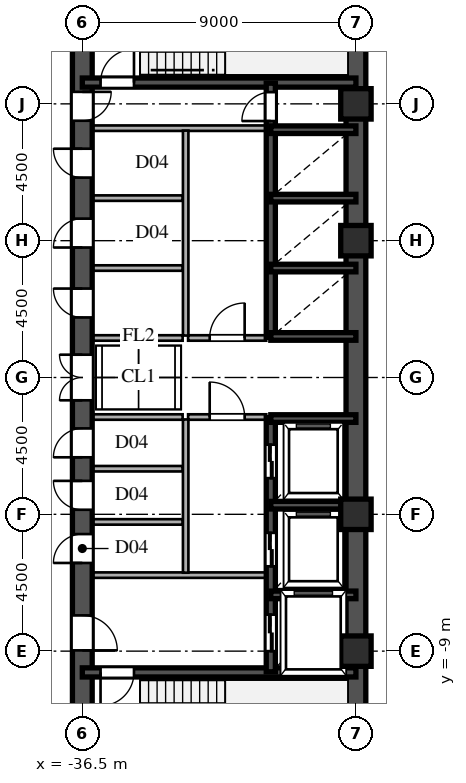
"""IFC4 building model, lengths in metres.
Left out: names, types, materials, properties, quantities, classifications, styles, units other than length and angle.
Written with IfcOpenShell. Run it as: python <this file> out.ifc"""

import sys

from ifc_helpers import new_model, si_unit, direction, frame, frame_2d, origin, origin_2d, place, context, subcontext, project, spatial, rectangle, hollow_rectangle, extrude, source, transform, mapped, element, fill, save


model = new_model("IFC4")
c1 = context("Model", 3, precision=1e-05, world=origin(), true_north=direction((0.0, 1.0)))
c2 = subcontext(c1, "Body", "Model", "MODEL_VIEW")
j1 = project(units=[si_unit("LENGTHUNIT", "METRE"), si_unit("PLANEANGLEUNIT", "RADIAN")], contexts=[c1])
p1 = place(None, origin())
s1 = spatial("IfcSite", under=j1, at=p1, CompositionType="ELEMENT")
p2 = place(p1, origin())
s2 = spatial("IfcBuilding", under=s1, at=p2, CompositionType="ELEMENT")
p3 = place(p2, frame((0.0, 0.0, 76.5)))
s3 = spatial("IfcBuildingStorey", under=s2, at=p3, CompositionType="ELEMENT", Elevation=76.5)
m1 = source(origin(), c2, "Body", "SweptSolid", [
    extrude(hollow_rectangle(XDim=1.0, YDim=1.0, WallThickness=0.042, at=origin_2d()), origin(), (0.0, 0.0, 1.0), 3.6),
])
for number, where, z_axis, x_axis in (
    (1, (-27.5, -9.0, 0.0), (0.0, 0.0, 1.0), (1.0, 0.0, 0.0)),
    (2, (-27.5, -4.5, 0.0), (0.0, 0.0, 1.0), (1.0, 0.0, 0.0)),
    (3, (-27.5, 4.5, 0.0), (0.0, 0.0, 1.0), (1.0, 0.0, 0.0)),
    (4, (-27.5, 9.0, 0.0), (0.0, 0.0, 1.0), (1.0, 0.0, 0.0)),
):
    element("IfcColumn", number, at=place(p3, frame(where, z_axis=z_axis, x_axis=x_axis)), inside=s3, PredefinedType="COLUMN", context=c2, shape_type="MappedRepresentation", body=[
        mapped(m1, transform((0.0, 0.0, 0.0), scale=1.0)),
    ])
for number, where, z_axis, x_axis in (
    (5, (-27.5, -13.5, 0.0), (0.0, 0.0, 1.0), (0.0, 1.0, 0.0)),
    (6, (-27.5, 1.3, 0.0), (0.0, 0.0, 1.0), (0.0, 1.0, 0.0)),
):
    element("IfcWall", number, at=place(p3, frame(where, z_axis=z_axis, x_axis=x_axis)), inside=s3, PredefinedType="SHEAR", context=c2, shape_type="SweptSolid", body=[
        extrude(rectangle(XDim=12.2, YDim=0.65, at=frame_2d((6.1, 0.0))), origin(), (0.0, 0.0, 1.0), 3.38),
    ])
p4 = place(p3, frame((-27.5, -1.3, 0.0), z_axis=(0.0, 0.0, 1.0), x_axis=(0.0, 1.0, 0.0)))
e7 = element("IfcWall", 7, at=p4, inside=s3, PredefinedType="SHEAR", context=c2, shape_type="SweptSolid", body=[
    extrude(rectangle(XDim=2.6, YDim=0.65, at=frame_2d((1.3, 0.0))), origin(), (0.0, 0.0, 1.0), 3.38),
])
p5 = place(p3, frame((-36.5, -13.65, 0.0), z_axis=(0.0, 0.0, 1.0), x_axis=(0.0, 1.0, 0.0)))
e8 = element("IfcWall", 8, at=p5, inside=s3, PredefinedType="SHEAR", context=c2, shape_type="SweptSolid", body=[
    extrude(rectangle(XDim=7.15, YDim=0.65, at=frame_2d((3.575, 0.0))), origin(), (0.0, 0.0, 1.0), 3.38),
])
p6 = place(p5, frame((4.675, 0.0, 0.0)))
e9 = element("IfcOpeningElement", 9, at=p6, cuts=e8, PredefinedType="OPENING", context=c2, shape_type="SweptSolid", body=[
    extrude(rectangle(XDim=1.15, YDim=2.2, at=frame_2d((0.575, 1.1))), frame((0.0, 0.335, 0.0), z_axis=(0.0, -1.0, 0.0), x_axis=(1.0, 0.0, 0.0)), (0.0, 0.0, 1.0), 0.67),
])
p7 = place(p3, frame((-36.5, -1.3, 0.0), z_axis=(0.0, 0.0, 1.0), x_axis=(0.0, 1.0, 0.0)))
e10 = element("IfcWall", 10, at=p7, inside=s3, PredefinedType="SHEAR", context=c2, shape_type="SweptSolid", body=[
    extrude(rectangle(XDim=2.6, YDim=0.65, at=frame_2d((1.3, 0.0))), origin(), (0.0, 0.0, 1.0), 3.38),
])
p8 = place(p7, frame((0.55, 0.0, 0.0)))
e11 = element("IfcOpeningElement", 11, at=p8, cuts=e10, PredefinedType="OPENING", context=c2, shape_type="SweptSolid", body=[
    extrude(rectangle(XDim=1.5, YDim=2.3, at=frame_2d((0.75, 1.15))), frame((0.0, 0.335, 0.0), z_axis=(0.0, -1.0, 0.0), x_axis=(1.0, 0.0, 0.0)), (0.0, 0.0, 1.0), 0.67),
])
p9 = place(p3, frame((-36.5, 8.2, 0.0), z_axis=(0.0, 0.0, 1.0), x_axis=(0.0, 1.0, 0.0)))
e12 = element("IfcWall", 12, at=p9, inside=s3, PredefinedType="SHEAR", context=c2, shape_type="SweptSolid", body=[
    extrude(rectangle(XDim=5.45, YDim=0.65, at=frame_2d((2.725, 0.0))), origin(), (0.0, 0.0, 1.0), 3.38),
])
p10 = place(p9, frame((0.245, 0.0, 0.0)))
e13 = element("IfcOpeningElement", 13, at=p10, cuts=e12, PredefinedType="OPENING", context=c2, shape_type="SweptSolid", body=[
    extrude(rectangle(XDim=0.95, YDim=2.15, at=frame_2d((0.475, 1.075))), frame((0.0, 0.335, 0.0), z_axis=(0.0, -1.0, 0.0), x_axis=(1.0, 0.0, 0.0)), (0.0, 0.0, 1.0), 0.67),
])
p11 = place(p3, frame((-36.5, -6.5, 0.0), z_axis=(0.0, 0.0, 1.0), x_axis=(0.0, 1.0, 0.0)))
e14 = element("IfcWall", 14, at=p11, inside=s3, PredefinedType="SHEAR", context=c2, shape_type="SweptSolid", body=[
    extrude(rectangle(XDim=1.75, YDim=0.65, at=frame_2d((0.875, 0.0))), origin(), (0.0, 0.0, 1.0), 3.38),
])
p12 = place(p11, frame((0.4, 0.0, 0.0)))
e15 = element("IfcOpeningElement", 15, at=p12, cuts=e14, PredefinedType="OPENING", context=c2, shape_type="SweptSolid", body=[
    extrude(rectangle(XDim=0.95, YDim=2.15, at=frame_2d((0.475, 1.075))), frame((0.0, 0.335, 0.0), z_axis=(0.0, -1.0, 0.0), x_axis=(1.0, 0.0, 0.0)), (0.0, 0.0, 1.0), 0.67),
])
p13 = place(p3, frame((-36.5, -4.75, 0.0), z_axis=(0.0, 0.0, 1.0), x_axis=(0.0, 1.0, 0.0)))
e16 = element("IfcWall", 16, at=p13, inside=s3, PredefinedType="SHEAR", context=c2, shape_type="SweptSolid", body=[
    extrude(rectangle(XDim=1.75, YDim=0.65, at=frame_2d((0.875, 0.0))), origin(), (0.0, 0.0, 1.0), 3.38),
])
p14 = place(p13, frame((0.4, 0.0, 0.0)))
e17 = element("IfcOpeningElement", 17, at=p14, cuts=e16, PredefinedType="OPENING", context=c2, shape_type="SweptSolid", body=[
    extrude(rectangle(XDim=0.95, YDim=2.15, at=frame_2d((0.475, 1.075))), frame((0.0, 0.335, 0.0), z_axis=(0.0, -1.0, 0.0), x_axis=(1.0, 0.0, 0.0)), (0.0, 0.0, 1.0), 0.67),
])
p15 = place(p3, frame((-36.5, -3.0, 0.0), z_axis=(0.0, 0.0, 1.0), x_axis=(0.0, 1.0, 0.0)))
e18 = element("IfcWall", 18, at=p15, inside=s3, PredefinedType="SHEAR", context=c2, shape_type="SweptSolid", body=[
    extrude(rectangle(XDim=1.7, YDim=0.65, at=frame_2d((0.85, 0.0))), origin(), (0.0, 0.0, 1.0), 3.38),
])
p16 = place(p15, frame((0.375, 0.0, 0.0)))
e19 = element("IfcOpeningElement", 19, at=p16, cuts=e18, PredefinedType="OPENING", context=c2, shape_type="SweptSolid", body=[
    extrude(rectangle(XDim=0.95, YDim=2.15, at=frame_2d((0.475, 1.075))), frame((0.0, 0.335, 0.0), z_axis=(0.0, -1.0, 0.0), x_axis=(1.0, 0.0, 0.0)), (0.0, 0.0, 1.0), 0.67),
])
p17 = place(p3, frame((-36.5, 1.3, 0.0), z_axis=(0.0, 0.0, 1.0), x_axis=(0.0, 1.0, 0.0)))
e20 = element("IfcWall", 20, at=p17, inside=s3, PredefinedType="SHEAR", context=c2, shape_type="SweptSolid", body=[
    extrude(rectangle(XDim=2.3, YDim=0.65, at=frame_2d((1.15, 0.0))), origin(), (0.0, 0.0, 1.0), 3.38),
])
p18 = place(p17, frame((0.675, 0.0, 0.0)))
e21 = element("IfcOpeningElement", 21, at=p18, cuts=e20, PredefinedType="OPENING", context=c2, shape_type="SweptSolid", body=[
    extrude(rectangle(XDim=0.95, YDim=2.15, at=frame_2d((0.475, 1.075))), frame((0.0, 0.335, 0.0), z_axis=(0.0, -1.0, 0.0), x_axis=(1.0, 0.0, 0.0)), (0.0, 0.0, 1.0), 0.67),
])
p19 = place(p3, frame((-36.5, 3.6, 0.0), z_axis=(0.0, 0.0, 1.0), x_axis=(0.0, 1.0, 0.0)))
e22 = element("IfcWall", 22, at=p19, inside=s3, PredefinedType="SHEAR", context=c2, shape_type="SweptSolid", body=[
    extrude(rectangle(XDim=2.3, YDim=0.65, at=frame_2d((1.15, 0.0))), origin(), (0.0, 0.0, 1.0), 3.38),
])
p20 = place(p19, frame((0.675, 0.0, 0.0)))
e23 = element("IfcOpeningElement", 23, at=p20, cuts=e22, PredefinedType="OPENING", context=c2, shape_type="SweptSolid", body=[
    extrude(rectangle(XDim=0.95, YDim=2.15, at=frame_2d((0.475, 1.075))), frame((0.0, 0.335, 0.0), z_axis=(0.0, -1.0, 0.0), x_axis=(1.0, 0.0, 0.0)), (0.0, 0.0, 1.0), 0.67),
])
p21 = place(p3, frame((-36.5, 5.9, 0.0), z_axis=(0.0, 0.0, 1.0), x_axis=(0.0, 1.0, 0.0)))
e24 = element("IfcWall", 24, at=p21, inside=s3, PredefinedType="SHEAR", context=c2, shape_type="SweptSolid", body=[
    extrude(rectangle(XDim=2.3, YDim=0.65, at=frame_2d((1.15, 0.0))), origin(), (0.0, 0.0, 1.0), 3.38),
])
p22 = place(p21, frame((0.675, 0.0, 0.0)))
e25 = element("IfcOpeningElement", 25, at=p22, cuts=e24, PredefinedType="OPENING", context=c2, shape_type="SweptSolid", body=[
    extrude(rectangle(XDim=0.95, YDim=2.15, at=frame_2d((0.475, 1.075))), frame((0.0, 0.335, 0.0), z_axis=(0.0, -1.0, 0.0), x_axis=(1.0, 0.0, 0.0)), (0.0, 0.0, 1.0), 0.67),
])
p23 = place(p3, frame((-36.5, -9.7, 0.0), z_axis=(0.0, 0.0, 1.0), x_axis=(1.0, 0.0, 0.0)))
e26 = element("IfcWall", 26, at=p23, inside=s3, PredefinedType="SHEAR", context=c2, shape_type="SweptSolid", body=[
    extrude(rectangle(XDim=9.0, YDim=0.3, at=frame_2d((4.5, 0.0))), origin(), (0.0, 0.0, 1.0), 3.38),
])
p24 = place(p23, frame((0.6, 0.0, 0.0)))
e27 = element("IfcOpeningElement", 27, at=p24, cuts=e26, PredefinedType="OPENING", context=c2, shape_type="SweptSolid", body=[
    extrude(rectangle(XDim=1.1, YDim=2.2, at=frame_2d((0.55, 1.1))), frame((0.0, 0.16, 0.0), z_axis=(0.0, -1.0, 0.0), x_axis=(1.0, 0.0, 0.0)), (0.0, 0.0, 1.0), 0.32),
])
p25 = place(p3, frame((-36.5, 9.7, 0.0), z_axis=(0.0, 0.0, 1.0), x_axis=(1.0, 0.0, 0.0)))
e28 = element("IfcWall", 28, at=p25, inside=s3, PredefinedType="SHEAR", context=c2, shape_type="SweptSolid", body=[
    extrude(rectangle(XDim=9.0, YDim=0.3, at=frame_2d((4.5, 0.0))), origin(), (0.0, 0.0, 1.0), 3.38),
])
p26 = place(p25, frame((0.6, 0.0, 0.0)))
e29 = element("IfcOpeningElement", 29, at=p26, cuts=e28, PredefinedType="OPENING", context=c2, shape_type="SweptSolid", body=[
    extrude(rectangle(XDim=1.1, YDim=2.2, at=frame_2d((0.55, 1.1))), frame((0.0, 0.16, 0.0), z_axis=(0.0, -1.0, 0.0), x_axis=(1.0, 0.0, 0.0)), (0.0, 0.0, 1.0), 0.32),
])
for number, where, z_axis, x_axis in (
    (30, (-30.3, -7.15, 0.0), (0.0, 0.0, 1.0), (1.0, 0.0, 0.0)),
    (31, (-30.3, -4.2, 0.0), (0.0, 0.0, 1.0), (1.0, 0.0, 0.0)),
    (32, (-30.3, -1.35, 0.0), (0.0, 0.0, 1.0), (1.0, 0.0, 0.0)),
    (33, (-30.3, 1.35, 0.0), (0.0, 0.0, 1.0), (1.0, 0.0, 0.0)),
    (34, (-30.3, 3.6, 0.0), (0.0, 0.0, 1.0), (1.0, 0.0, 0.0)),
    (35, (-30.3, 5.9, 0.0), (0.0, 0.0, 1.0), (1.0, 0.0, 0.0)),
    (36, (-30.3, 8.15, 0.0), (0.0, 0.0, 1.0), (1.0, 0.0, 0.0)),
):
    element("IfcWall", number, at=place(p3, frame(where, z_axis=z_axis, x_axis=x_axis)), inside=s3, PredefinedType="SHEAR", context=c2, shape_type="SweptSolid", body=[
        extrude(rectangle(XDim=2.8, YDim=0.25, at=frame_2d((1.4, 0.0))), origin(), (0.0, 0.0, 1.0), 3.38),
    ])
p27 = place(p3, frame((-30.3, -9.68, 0.0), z_axis=(0.0, 0.0, 1.0), x_axis=(0.0, 1.0, 0.0)))
e37 = element("IfcWall", 37, at=p27, inside=s3, PredefinedType="SHEAR", context=c2, shape_type="SweptSolid", body=[
    extrude(rectangle(XDim=2.56, YDim=0.3, at=frame_2d((1.28, 0.0))), origin(), (0.0, 0.0, 1.0), 3.38),
])
p28 = place(p27, frame((0.68, 0.0, 0.0)))
e38 = element("IfcOpeningElement", 38, at=p28, cuts=e37, PredefinedType="OPENING", context=c2, shape_type="SweptSolid", body=[
    extrude(rectangle(XDim=1.2, YDim=2.25, at=frame_2d((0.6, 1.125))), frame((0.0, 0.16, 0.0), z_axis=(0.0, -1.0, 0.0), x_axis=(1.0, 0.0, 0.0)), (0.0, 0.0, 1.0), 0.32),
])
p29 = place(p3, frame((-30.3, -7.12, 0.0), z_axis=(0.0, 0.0, 1.0), x_axis=(0.0, 1.0, 0.0)))
e39 = element("IfcWall", 39, at=p29, inside=s3, PredefinedType="SHEAR", context=c2, shape_type="SweptSolid", body=[
    extrude(rectangle(XDim=2.92, YDim=0.3, at=frame_2d((1.46, 0.0))), origin(), (0.0, 0.0, 1.0), 3.38),
])
p30 = place(p29, frame((0.91, 0.0, 0.0)))
e40 = element("IfcOpeningElement", 40, at=p30, cuts=e39, PredefinedType="OPENING", context=c2, shape_type="SweptSolid", body=[
    extrude(rectangle(XDim=1.1, YDim=2.2, at=frame_2d((0.55, 1.1))), frame((0.0, 0.16, 0.0), z_axis=(0.0, -1.0, 0.0), x_axis=(1.0, 0.0, 0.0)), (0.0, 0.0, 1.0), 0.32),
])
p31 = place(p3, frame((-30.3, -4.2, 0.0), z_axis=(0.0, 0.0, 1.0), x_axis=(0.0, 1.0, 0.0)))
e41 = element("IfcWall", 41, at=p31, inside=s3, PredefinedType="SHEAR", context=c2, shape_type="SweptSolid", body=[
    extrude(rectangle(XDim=2.88, YDim=0.3, at=frame_2d((1.44, 0.0))), origin(), (0.0, 0.0, 1.0), 3.38),
])
p32 = place(p31, frame((0.89, 0.0, 0.0)))
e42 = element("IfcOpeningElement", 42, at=p32, cuts=e41, PredefinedType="OPENING", context=c2, shape_type="SweptSolid", body=[
    extrude(rectangle(XDim=1.1, YDim=2.2, at=frame_2d((0.55, 1.1))), frame((0.0, 0.16, 0.0), z_axis=(0.0, -1.0, 0.0), x_axis=(1.0, 0.0, 0.0)), (0.0, 0.0, 1.0), 0.32),
])
p33 = place(p3, frame((-30.3, 1.32, 0.0), z_axis=(0.0, 0.0, 1.0), x_axis=(0.0, 1.0, 0.0)))
e43 = element("IfcWall", 43, at=p33, inside=s3, PredefinedType="SHEAR", context=c2, shape_type="SweptSolid", body=[
    extrude(rectangle(XDim=2.28, YDim=0.3, at=frame_2d((1.14, 0.0))), origin(), (0.0, 0.0, 1.0), 3.38),
])
p34 = place(p3, frame((-30.3, 3.6, 0.0), z_axis=(0.0, 0.0, 1.0), x_axis=(0.0, 1.0, 0.0)))
e44 = element("IfcWall", 44, at=p34, inside=s3, PredefinedType="SHEAR", context=c2, shape_type="SweptSolid", body=[
    extrude(rectangle(XDim=2.3, YDim=0.3, at=frame_2d((1.15, 0.0))), origin(), (0.0, 0.0, 1.0), 3.38),
])
p35 = place(p3, frame((-30.3, 5.9, 0.0), z_axis=(0.0, 0.0, 1.0), x_axis=(0.0, 1.0, 0.0)))
e45 = element("IfcWall", 45, at=p35, inside=s3, PredefinedType="SHEAR", context=c2, shape_type="SweptSolid", body=[
    extrude(rectangle(XDim=2.25, YDim=0.3, at=frame_2d((1.125, 0.0))), origin(), (0.0, 0.0, 1.0), 3.38),
])
p36 = place(p3, frame((-30.3, 8.15, 0.0), z_axis=(0.0, 0.0, 1.0), x_axis=(0.0, 1.0, 0.0)))
e46 = element("IfcWall", 46, at=p36, inside=s3, PredefinedType="SHEAR", context=c2, shape_type="SweptSolid", body=[
    extrude(rectangle(XDim=1.53, YDim=0.3, at=frame_2d((0.765, 0.0))), origin(), (0.0, 0.0, 1.0), 3.38),
])
p37 = place(p36, frame((0.285, 0.0, 0.0)))
e47 = element("IfcOpeningElement", 47, at=p37, cuts=e46, PredefinedType="OPENING", context=c2, shape_type="SweptSolid", body=[
    extrude(rectangle(XDim=0.95, YDim=2.15, at=frame_2d((0.475, 1.075))), frame((0.0, 0.16, 0.0), z_axis=(0.0, -1.0, 0.0), x_axis=(1.0, 0.0, 0.0)), (0.0, 0.0, 1.0), 0.32),
])
for number, where, z_axis, x_axis in (
    (48, (-36.15, -6.5, 0.0), (0.0, 0.0, 1.0), (1.0, 0.0, 0.0)),
    (49, (-36.15, 8.2, 0.0), (0.0, 0.0, 1.0), (1.0, 0.0, 0.0)),
):
    element("IfcWall", number, at=place(p3, frame(where, z_axis=z_axis, x_axis=x_axis)), inside=s3, PredefinedType="PARTITIONING", context=c2, shape_type="SweptSolid", body=[
        extrude(rectangle(XDim=5.7, YDim=0.18, at=frame_2d((2.85, 0.0))), origin(), (0.0, 0.0, 1.0), 3.38),
    ])
p38 = place(p3, frame((-33.1, -6.42, 0.0), z_axis=(0.0, 0.0, 1.0), x_axis=(0.0, 1.0, 0.0)))
e50 = element("IfcWall", 50, at=p38, inside=s3, PredefinedType="PARTITIONING", context=c2, shape_type="SweptSolid", body=[
    extrude(rectangle(XDim=5.04, YDim=0.18, at=frame_2d((2.52, 0.0))), origin(), (0.0, 0.0, 1.0), 3.38),
])
p39 = place(p3, frame((-33.1, 1.38, 0.0), z_axis=(0.0, 0.0, 1.0), x_axis=(0.0, 1.0, 0.0)))
e51 = element("IfcWall", 51, at=p39, inside=s3, PredefinedType="PARTITIONING", context=c2, shape_type="SweptSolid", body=[
    extrude(rectangle(XDim=6.74, YDim=0.18, at=frame_2d((3.37, 0.0))), origin(), (0.0, 0.0, 1.0), 3.38),
])
p40 = place(p3, frame((-33.02, -1.3, 0.0), z_axis=(0.0, 0.0, 1.0), x_axis=(1.0, 0.0, 0.0)))
e52 = element("IfcWall", 52, at=p40, inside=s3, PredefinedType="PARTITIONING", context=c2, shape_type="SweptSolid", body=[
    extrude(rectangle(XDim=2.57, YDim=0.18, at=frame_2d((1.285, 0.0))), origin(), (0.0, 0.0, 1.0), 3.38),
])
p41 = place(p40, frame((0.71, 0.0, 0.0)))
e53 = element("IfcOpeningElement", 53, at=p41, cuts=e52, PredefinedType="OPENING", context=c2, shape_type="SweptSolid", body=[
    extrude(rectangle(XDim=1.15, YDim=2.2, at=frame_2d((0.575, 1.1))), frame((0.0, 0.1, 0.0), z_axis=(0.0, -1.0, 0.0), x_axis=(1.0, 0.0, 0.0)), (0.0, 0.0, 1.0), 0.2),
])
p42 = place(p3, frame((-33.02, 1.3, 0.0), z_axis=(0.0, 0.0, 1.0), x_axis=(1.0, 0.0, 0.0)))
e54 = element("IfcWall", 54, at=p42, inside=s3, PredefinedType="PARTITIONING", context=c2, shape_type="SweptSolid", body=[
    extrude(rectangle(XDim=2.57, YDim=0.18, at=frame_2d((1.285, 0.0))), origin(), (0.0, 0.0, 1.0), 3.38),
])
p43 = place(p42, frame((0.71, 0.0, 0.0)))
e55 = element("IfcOpeningElement", 55, at=p43, cuts=e54, PredefinedType="OPENING", context=c2, shape_type="SweptSolid", body=[
    extrude(rectangle(XDim=1.15, YDim=2.2, at=frame_2d((0.575, 1.1))), frame((0.0, 0.1, 0.0), z_axis=(0.0, -1.0, 0.0), x_axis=(1.0, 0.0, 0.0)), (0.0, 0.0, 1.0), 0.2),
])
for number, where, z_axis, x_axis in (
    (56, (-36.15, -1.3, 0.0), (0.0, 0.0, 1.0), (1.0, 0.0, 0.0)),
    (57, (-36.15, 1.3, 0.0), (0.0, 0.0, 1.0), (1.0, 0.0, 0.0)),
    (58, (-36.15, -4.75, 0.0), (0.0, 0.0, 1.0), (1.0, 0.0, 0.0)),
    (59, (-36.15, -3.0, 0.0), (0.0, 0.0, 1.0), (1.0, 0.0, 0.0)),
    (60, (-36.15, 3.6, 0.0), (0.0, 0.0, 1.0), (1.0, 0.0, 0.0)),
    (61, (-36.15, 5.9, 0.0), (0.0, 0.0, 1.0), (1.0, 0.0, 0.0)),
):
    element("IfcWall", number, at=place(p3, frame(where, z_axis=z_axis, x_axis=x_axis)), inside=s3, PredefinedType="PARTITIONING", context=c2, shape_type="SweptSolid", body=[
        extrude(rectangle(XDim=2.95, YDim=0.18, at=frame_2d((1.475, 0.0))), origin(), (0.0, 0.0, 1.0), 3.38),
    ])
m2 = source(origin(), c2, "Body", "SweptSolid", [
    extrude(rectangle(XDim=1.15, YDim=2.2, at=frame_2d((0.575, 1.1))), frame((0.0, 0.025, 0.0), z_axis=(0.0, -1.0, 0.0), x_axis=(1.0, 0.0, 0.0)), (0.0, 0.0, 1.0), 0.05),
])
p44 = place(p6, frame((1.15, 0.0, 0.0), z_axis=(0.0, 0.0, 1.0), x_axis=(-1.0, 0.0, 0.0)))
e62 = element("IfcDoor", 62, at=p44, inside=s3, OperationType="SINGLE_SWING_LEFT", PredefinedType="DOOR", context=c2, shape_type="MappedRepresentation", body=[
    mapped(m2, transform((0.0, 0.0, 0.0), scale=1.0)),
])
fill(e9, e62)
m3 = source(origin(), c2, "Body", "SweptSolid", [
    extrude(rectangle(XDim=1.5, YDim=2.3, at=frame_2d((0.75, 1.15))), frame((0.0, 0.025, 0.0), z_axis=(0.0, -1.0, 0.0), x_axis=(1.0, 0.0, 0.0)), (0.0, 0.0, 1.0), 0.05),
])
p45 = place(p8, origin())
e63 = element("IfcDoor", 63, at=p45, inside=s3, OperationType="DOUBLE_SWING_LEFT", PredefinedType="DOOR", context=c2, shape_type="MappedRepresentation", body=[
    mapped(m3, transform((0.0, 0.0, 0.0), scale=1.0)),
])
fill(e11, e63)
m4 = source(origin(), c2, "Body", "SweptSolid", [
    extrude(rectangle(XDim=0.95, YDim=2.15, at=frame_2d((0.475, 1.075))), frame((0.0, 0.025, 0.0), z_axis=(0.0, -1.0, 0.0), x_axis=(1.0, 0.0, 0.0)), (0.0, 0.0, 1.0), 0.05),
])
p46 = place(p10, frame((0.95, 0.0, 0.0), z_axis=(0.0, 0.0, 1.0), x_axis=(-1.0, 0.0, 0.0)))
e64 = element("IfcDoor", 64, at=p46, inside=s3, OperationType="SINGLE_SWING_RIGHT", PredefinedType="DOOR", context=c2, shape_type="MappedRepresentation", body=[
    mapped(m4, transform((0.0, 0.0, 0.0), scale=1.0)),
])
fill(e13, e64)
p47 = place(p12, origin())
e65 = element("IfcDoor", 65, at=p47, inside=s3, OperationType="SINGLE_SWING_LEFT", PredefinedType="DOOR", context=c2, shape_type="MappedRepresentation", body=[
    mapped(m4, transform((0.0, 0.0, 0.0), scale=1.0)),
])
fill(e15, e65)
p48 = place(p14, origin())
e66 = element("IfcDoor", 66, at=p48, inside=s3, OperationType="SINGLE_SWING_RIGHT", PredefinedType="DOOR", context=c2, shape_type="MappedRepresentation", body=[
    mapped(m4, transform((0.0, 0.0, 0.0), scale=1.0)),
])
fill(e17, e66)
p49 = place(p16, origin())
e67 = element("IfcDoor", 67, at=p49, inside=s3, OperationType="SINGLE_SWING_LEFT", PredefinedType="DOOR", context=c2, shape_type="MappedRepresentation", body=[
    mapped(m4, transform((0.0, 0.0, 0.0), scale=1.0)),
])
fill(e19, e67)
p50 = place(p18, origin())
e68 = element("IfcDoor", 68, at=p50, inside=s3, OperationType="SINGLE_SWING_RIGHT", PredefinedType="DOOR", context=c2, shape_type="MappedRepresentation", body=[
    mapped(m4, transform((0.0, 0.0, 0.0), scale=1.0)),
])
fill(e21, e68)
p51 = place(p20, origin())
e69 = element("IfcDoor", 69, at=p51, inside=s3, OperationType="SINGLE_SWING_LEFT", PredefinedType="DOOR", context=c2, shape_type="MappedRepresentation", body=[
    mapped(m4, transform((0.0, 0.0, 0.0), scale=1.0)),
])
fill(e23, e69)
p52 = place(p22, origin())
e70 = element("IfcDoor", 70, at=p52, inside=s3, OperationType="SINGLE_SWING_RIGHT", PredefinedType="DOOR", context=c2, shape_type="MappedRepresentation", body=[
    mapped(m4, transform((0.0, 0.0, 0.0), scale=1.0)),
])
fill(e25, e70)
m5 = source(origin(), c2, "Body", "SweptSolid", [
    extrude(rectangle(XDim=1.1, YDim=2.2, at=frame_2d((0.55, 1.1))), frame((0.0, 0.025, 0.0), z_axis=(0.0, -1.0, 0.0), x_axis=(1.0, 0.0, 0.0)), (0.0, 0.0, 1.0), 0.05),
])
p53 = place(p24, frame((1.1, 0.0, 0.0), z_axis=(0.0, 0.0, 1.0), x_axis=(-1.0, 0.0, 0.0)))
e71 = element("IfcDoor", 71, at=p53, inside=s3, OperationType="SINGLE_SWING_LEFT", PredefinedType="DOOR", context=c2, shape_type="MappedRepresentation", body=[
    mapped(m5, transform((0.0, 0.0, 0.0), scale=1.0)),
])
fill(e27, e71)
p54 = place(p26, origin())
e72 = element("IfcDoor", 72, at=p54, inside=s3, OperationType="SINGLE_SWING_RIGHT", PredefinedType="DOOR", context=c2, shape_type="MappedRepresentation", body=[
    mapped(m5, transform((0.0, 0.0, 0.0), scale=1.0)),
])
fill(e29, e72)
m6 = source(origin(), c2, "Body", "SweptSolid", [
    extrude(rectangle(XDim=1.2, YDim=2.25, at=frame_2d((0.6, 1.125))), frame((0.0, 0.025, 0.0), z_axis=(0.0, -1.0, 0.0), x_axis=(1.0, 0.0, 0.0)), (0.0, 0.0, 1.0), 0.05),
])
p55 = place(p28, origin())
e73 = element("IfcDoor", 73, at=p55, inside=s3, OperationType="DOUBLE_DOOR_SLIDING", PredefinedType="DOOR", context=c2, shape_type="MappedRepresentation", body=[
    mapped(m6, transform((0.0, 0.0, 0.0), scale=1.0)),
])
fill(e38, e73)
m7 = source(origin(), c2, "Body", "SweptSolid", [
    extrude(rectangle(XDim=1.1, YDim=2.2, at=frame_2d((0.55, 1.1))), frame((0.0, 0.025, 0.0), z_axis=(0.0, -1.0, 0.0), x_axis=(1.0, 0.0, 0.0)), (0.0, 0.0, 1.0), 0.05),
])
p56 = place(p30, origin())
e74 = element("IfcDoor", 74, at=p56, inside=s3, OperationType="DOUBLE_DOOR_SLIDING", PredefinedType="DOOR", context=c2, shape_type="MappedRepresentation", body=[
    mapped(m7, transform((0.0, 0.0, 0.0), scale=1.0)),
])
fill(e40, e74)
p57 = place(p32, origin())
e75 = element("IfcDoor", 75, at=p57, inside=s3, OperationType="DOUBLE_DOOR_SLIDING", PredefinedType="DOOR", context=c2, shape_type="MappedRepresentation", body=[
    mapped(m7, transform((0.0, 0.0, 0.0), scale=1.0)),
])
fill(e42, e75)
p58 = place(p37, origin())
e76 = element("IfcDoor", 76, at=p58, inside=s3, OperationType="SINGLE_SWING_LEFT", PredefinedType="DOOR", context=c2, shape_type="MappedRepresentation", body=[
    mapped(m4, transform((0.0, 0.0, 0.0), scale=1.0)),
])
fill(e47, e76)
p59 = place(p41, origin())
e77 = element("IfcDoor", 77, at=p59, inside=s3, OperationType="SINGLE_SWING_LEFT", PredefinedType="DOOR", context=c2, shape_type="MappedRepresentation", body=[
    mapped(m2, transform((0.0, 0.0, 0.0), scale=1.0)),
])
fill(e53, e77)
p60 = place(p43, origin())
e78 = element("IfcDoor", 78, at=p60, inside=s3, OperationType="SINGLE_SWING_RIGHT", PredefinedType="DOOR", context=c2, shape_type="MappedRepresentation", body=[
    mapped(m2, transform((0.0, 0.0, 0.0), scale=1.0)),
])
fill(e55, e78)
save(model, sys.argv[1])
